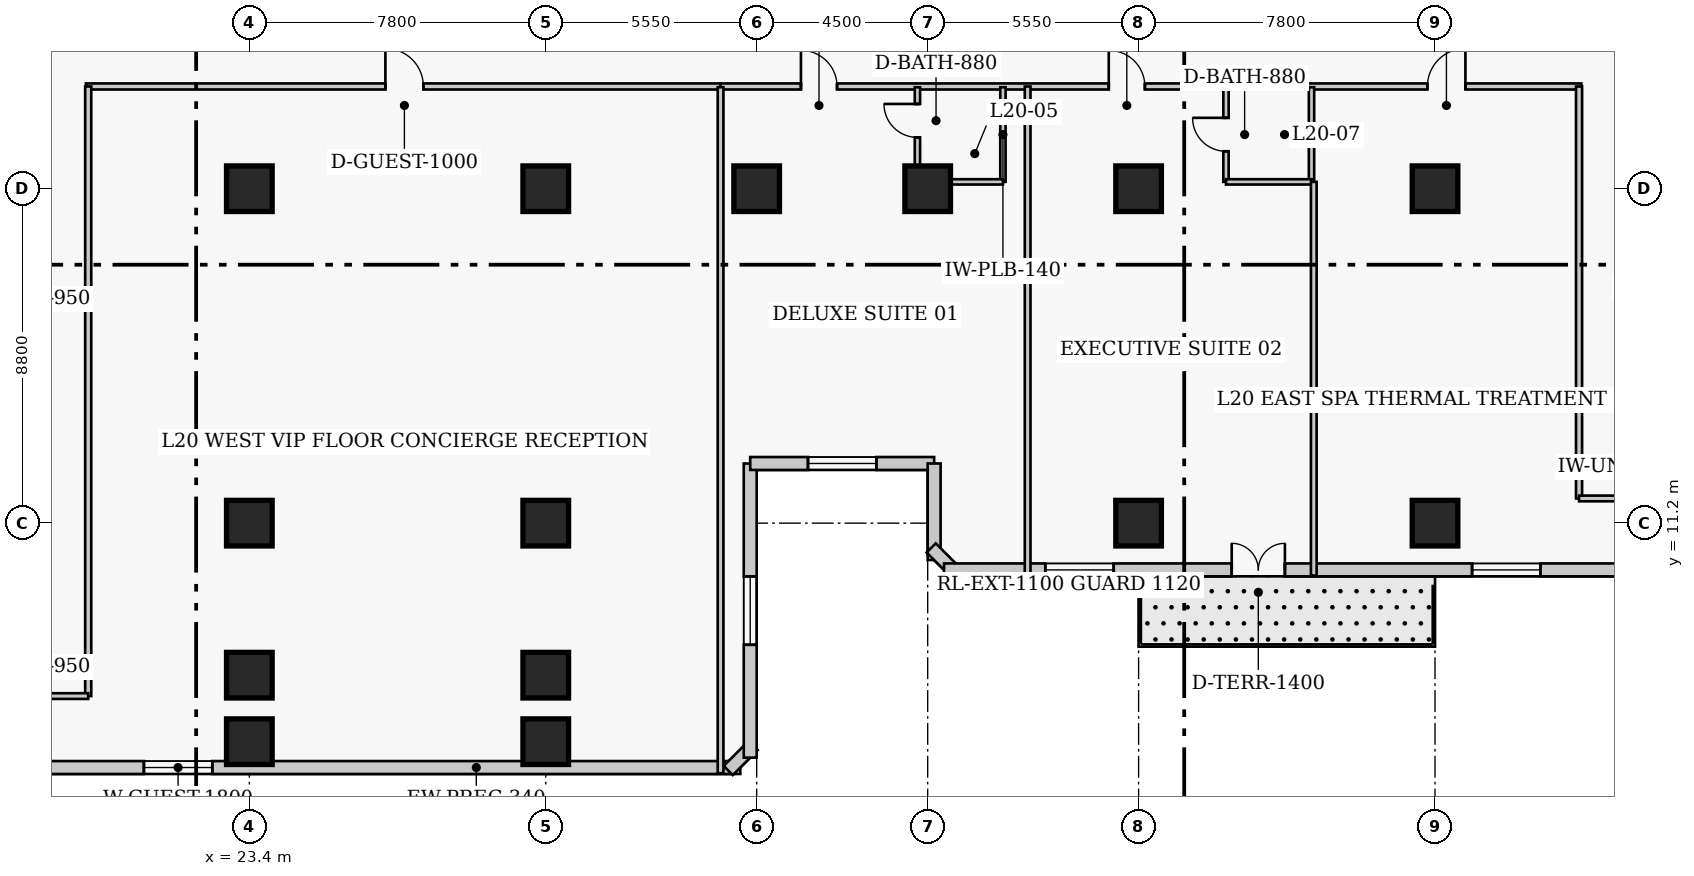
"""IFC4 building model, lengths in metres.
Left out: names, types, materials, properties, quantities, classifications, styles, units other than length and angle.
Written with IfcOpenShell. Run it as: python <this file> out.ifc"""

import sys

from ifc_helpers import new_model, si_unit, direction, frame, frame_2d, origin, origin_2d, place, context, subcontext, project, spatial, rectangle, extrude, element, fill, save


model = new_model("IFC4")
c1 = context("Model", 3, precision=1e-05, world=origin(), true_north=direction((0.0, 1.0)))
c2 = subcontext(c1, "Body", "Model", "MODEL_VIEW")
j1 = project(units=[si_unit("LENGTHUNIT", "METRE"), si_unit("PLANEANGLEUNIT", "RADIAN")], contexts=[c1])
p1 = place(None, origin())
s1 = spatial("IfcSite", under=j1, at=p1, CompositionType="ELEMENT")
p2 = place(p1, origin())
s2 = spatial("IfcBuilding", under=s1, at=p2, CompositionType="ELEMENT")
p3 = place(p2, frame((0.0, 0.0, 84.2)))
s3 = spatial("IfcBuildingStorey", under=s2, at=p3, CompositionType="ELEMENT", Elevation=84.2)
for number, where, z_axis, x_axis in (
    (1, (23.4, 11.2, 0.0), (0.0, 0.0, 1.0), (1.0, 0.0, 0.0)),
    (2, (23.4, 20.0, 0.0), (0.0, 0.0, 1.0), (1.0, 0.0, 0.0)),
    (3, (31.2, 11.2, 0.0), (0.0, 0.0, 1.0), (1.0, 0.0, 0.0)),
    (4, (31.2, 20.0, 0.0), (0.0, 0.0, 1.0), (1.0, 0.0, 0.0)),
    (5, (36.75, 20.0, 0.0), (0.0, 0.0, 1.0), (1.0, 0.0, 0.0)),
    (6, (41.25, 20.0, 0.0), (0.0, 0.0, 1.0), (1.0, 0.0, 0.0)),
    (7, (46.8, 11.2, 0.0), (0.0, 0.0, 1.0), (1.0, 0.0, 0.0)),
    (8, (46.8, 20.0, 0.0), (0.0, 0.0, 1.0), (1.0, 0.0, 0.0)),
    (9, (54.6, 11.2, 0.0), (0.0, 0.0, 1.0), (1.0, 0.0, 0.0)),
    (10, (54.6, 20.0, 0.0), (0.0, 0.0, 1.0), (1.0, 0.0, 0.0)),
    (11, (23.4, 7.2, 0.0), (0.0, 0.0, 1.0), (1.0, 0.0, 0.0)),
    (12, (31.2, 7.2, 0.0), (0.0, 0.0, 1.0), (1.0, 0.0, 0.0)),
    (13, (23.4, 5.45, 0.0), (0.0, 0.0, 1.0), (1.0, 0.0, 0.0)),
    (14, (31.2, 5.45, 0.0), (0.0, 0.0, 1.0), (1.0, 0.0, 0.0)),
):
    element("IfcColumn", number, at=place(p3, frame(where, z_axis=z_axis, x_axis=x_axis)), inside=s3, PredefinedType="COLUMN", context=c2, shape_type="SweptSolid", body=[
        extrude(rectangle(XDim=1.2, YDim=1.2, at=origin_2d()), origin(), (0.0, 0.0, 1.0), 3.8),
    ])
p4 = place(p3, frame((8.03, 4.77, 0.0), z_axis=(0.0, 0.0, 1.0), x_axis=(1.0, 0.0, 0.0)))
e15 = element("IfcWall", 15, at=p4, inside=s3, PredefinedType="SOLIDWALL", context=c2, shape_type="SweptSolid", body=[
    extrude(rectangle(XDim=28.29, YDim=0.34, at=frame_2d((14.145, 0.0))), origin(), (0.0, 0.0, 1.0), 3.54),
])
p5 = place(p4, frame((12.595, 0.0, 0.85)))
e16 = element("IfcOpeningElement", 16, at=p5, cuts=e15, PredefinedType="OPENING", context=c2, shape_type="SweptSolid", body=[
    extrude(rectangle(XDim=1.8, YDim=1.8, at=frame_2d((0.9, 0.9))), frame((0.0, 0.18, 0.0), z_axis=(0.0, -1.0, 0.0), x_axis=(1.0, 0.0, 0.0)), (0.0, 0.0, 1.0), 0.36),
])
p6 = place(p3, frame((36.001, 4.692, 0.0), z_axis=(0.0, 0.0, 1.0), x_axis=(0.707238225886, 0.706975312048, 0.0)))
e17 = element("IfcWall", 17, at=p6, inside=s3, PredefinedType="SOLIDWALL", context=c2, shape_type="SweptSolid", body=[
    extrude(rectangle(XDim=0.929, YDim=0.34, at=frame_2d((0.464, 0.0))), origin(), (0.0, 0.0, 1.0), 3.54),
])
p7 = place(p3, frame((36.58, 5.03, 0.0), z_axis=(0.0, 0.0, 1.0), x_axis=(0.0, 1.0, 0.0)))
e18 = element("IfcWall", 18, at=p7, inside=s3, PredefinedType="SOLIDWALL", context=c2, shape_type="SweptSolid", body=[
    extrude(rectangle(XDim=7.74, YDim=0.34, at=frame_2d((3.87, 0.0))), origin(), (0.0, 0.0, 1.0), 3.54),
])
p8 = place(p7, frame((2.97, 0.0, 0.85)))
e19 = element("IfcOpeningElement", 19, at=p8, cuts=e18, PredefinedType="OPENING", context=c2, shape_type="SweptSolid", body=[
    extrude(rectangle(XDim=1.8, YDim=1.8, at=frame_2d((0.9, 0.9))), frame((0.0, 0.18, 0.0), z_axis=(0.0, -1.0, 0.0), x_axis=(1.0, 0.0, 0.0)), (0.0, 0.0, 1.0), 0.36),
])
p9 = place(p3, frame((36.58, 12.77, 0.0), z_axis=(0.0, 0.0, 1.0), x_axis=(1.0, 0.0, 0.0)))
e20 = element("IfcWall", 20, at=p9, inside=s3, PredefinedType="SOLIDWALL", context=c2, shape_type="SweptSolid", body=[
    extrude(rectangle(XDim=4.84, YDim=0.34, at=frame_2d((2.42, 0.0))), origin(), (0.0, 0.0, 1.0), 3.54),
])
p10 = place(p9, frame((1.52, 0.0, 0.85)))
e21 = element("IfcOpeningElement", 21, at=p10, cuts=e20, PredefinedType="OPENING", context=c2, shape_type="SweptSolid", body=[
    extrude(rectangle(XDim=1.8, YDim=1.8, at=frame_2d((0.9, 0.9))), frame((0.0, 0.18, 0.0), z_axis=(0.0, -1.0, 0.0), x_axis=(1.0, 0.0, 0.0)), (0.0, 0.0, 1.0), 0.36),
])
p11 = place(p3, frame((41.42, 12.77, 0.0), z_axis=(0.0, 0.0, 1.0), x_axis=(0.0, -1.0, 0.0)))
e22 = element("IfcWall", 22, at=p11, inside=s3, PredefinedType="SOLIDWALL", context=c2, shape_type="SweptSolid", body=[
    extrude(rectangle(XDim=2.54, YDim=0.34, at=frame_2d((1.27, 0.0))), origin(), (0.0, 0.0, 1.0), 3.54),
])
p12 = place(p3, frame((41.342, 10.549, 0.0), z_axis=(0.0, 0.0, 1.0), x_axis=(0.707106781187, -0.707106781187, 0.0)))
e23 = element("IfcWall", 23, at=p12, inside=s3, PredefinedType="SOLIDWALL", context=c2, shape_type="SweptSolid", body=[
    extrude(rectangle(XDim=0.929, YDim=0.34, at=frame_2d((0.464, 0.0))), origin(), (0.0, 0.0, 1.0), 3.54),
])
p13 = place(p3, frame((41.68, 9.97, 0.0), z_axis=(0.0, 0.0, 1.0), x_axis=(1.0, 0.0, 0.0)))
e24 = element("IfcWall", 24, at=p13, inside=s3, PredefinedType="SOLIDWALL", context=c2, shape_type="SweptSolid", body=[
    extrude(rectangle(XDim=28.29, YDim=0.34, at=frame_2d((14.145, 0.0))), origin(), (0.0, 0.0, 1.0), 3.54),
])
p14 = place(p13, frame((7.57, 0.0, 0.0)))
e25 = element("IfcOpeningElement", 25, at=p14, cuts=e24, PredefinedType="OPENING", context=c2, shape_type="SweptSolid", body=[
    extrude(rectangle(XDim=1.4, YDim=2.15, at=frame_2d((0.7, 1.075))), frame((0.0, 0.18, 0.0), z_axis=(0.0, -1.0, 0.0), x_axis=(1.0, 0.0, 0.0)), (0.0, 0.0, 1.0), 0.36),
])
p15 = place(p13, frame((2.665, 0.0, 0.85)))
e26 = element("IfcOpeningElement", 26, at=p15, cuts=e24, PredefinedType="OPENING", context=c2, shape_type="SweptSolid", body=[
    extrude(rectangle(XDim=1.8, YDim=1.8, at=frame_2d((0.9, 0.9))), frame((0.0, 0.18, 0.0), z_axis=(0.0, -1.0, 0.0), x_axis=(1.0, 0.0, 0.0)), (0.0, 0.0, 1.0), 0.36),
])
p16 = place(p13, frame((13.895, 0.0, 0.85)))
e27 = element("IfcOpeningElement", 27, at=p16, cuts=e24, PredefinedType="OPENING", context=c2, shape_type="SweptSolid", body=[
    extrude(rectangle(XDim=1.8, YDim=1.8, at=frame_2d((0.9, 0.9))), frame((0.0, 0.18, 0.0), z_axis=(0.0, -1.0, 0.0), x_axis=(1.0, 0.0, 0.0)), (0.0, 0.0, 1.0), 0.36),
])
p17 = place(p3, frame((19.1, 22.69, 0.0), z_axis=(0.0, 0.0, 1.0), x_axis=(1.0, 0.0, 0.0)))
e28 = element("IfcWall", 28, at=p17, inside=s3, PredefinedType="PARTITIONING", context=c2, shape_type="SweptSolid", body=[
    extrude(rectangle(XDim=16.7, YDim=0.16, at=frame_2d((8.35, 0.0))), origin(), (0.0, 0.0, 1.0), 3.54),
])
p18 = place(p17, frame((7.88, 0.0, 0.0)))
e29 = element("IfcOpeningElement", 29, at=p18, cuts=e28, PredefinedType="OPENING", context=c2, shape_type="SweptSolid", body=[
    extrude(rectangle(XDim=1.0, YDim=2.15, at=frame_2d((0.5, 1.075))), frame((0.0, 0.09, 0.0), z_axis=(0.0, -1.0, 0.0), x_axis=(1.0, 0.0, 0.0)), (0.0, 0.0, 1.0), 0.18),
])
p19 = place(p3, frame((35.8, 22.69, 0.0), z_axis=(0.0, 0.0, 1.0), x_axis=(1.0, 0.0, 0.0)))
e30 = element("IfcWall", 30, at=p19, inside=s3, PredefinedType="PARTITIONING", context=c2, shape_type="SweptSolid", body=[
    extrude(rectangle(XDim=22.65, YDim=0.16, at=frame_2d((11.325, 0.0))), origin(), (0.0, 0.0, 1.0), 3.54),
])
p20 = place(p19, frame((2.115, 0.0, 0.0)))
e31 = element("IfcOpeningElement", 31, at=p20, cuts=e30, PredefinedType="OPENING", context=c2, shape_type="SweptSolid", body=[
    extrude(rectangle(XDim=0.95, YDim=2.1, at=frame_2d((0.475, 1.05))), frame((0.0, 0.09, 0.0), z_axis=(0.0, -1.0, 0.0), x_axis=(1.0, 0.0, 0.0)), (0.0, 0.0, 1.0), 0.18),
])
p21 = place(p19, frame((10.215, 0.0, 0.0)))
e32 = element("IfcOpeningElement", 32, at=p21, cuts=e30, PredefinedType="OPENING", context=c2, shape_type="SweptSolid", body=[
    extrude(rectangle(XDim=0.95, YDim=2.1, at=frame_2d((0.475, 1.05))), frame((0.0, 0.09, 0.0), z_axis=(0.0, -1.0, 0.0), x_axis=(1.0, 0.0, 0.0)), (0.0, 0.0, 1.0), 0.18),
])
p22 = place(p19, frame((18.6, 0.0, 0.0)))
e33 = element("IfcOpeningElement", 33, at=p22, cuts=e30, PredefinedType="OPENING", context=c2, shape_type="SweptSolid", body=[
    extrude(rectangle(XDim=1.0, YDim=2.15, at=frame_2d((0.5, 1.075))), frame((0.0, 0.09, 0.0), z_axis=(0.0, -1.0, 0.0), x_axis=(1.0, 0.0, 0.0)), (0.0, 0.0, 1.0), 0.18),
])
p23 = place(p3, frame((19.16, 6.65, 0.0), z_axis=(0.0, 0.0, 1.0), x_axis=(0.0, 1.0, 0.0)))
e34 = element("IfcWall", 34, at=p23, inside=s3, PredefinedType="PARTITIONING", context=c2, shape_type="SweptSolid", body=[
    extrude(rectangle(XDim=16.04, YDim=0.16, at=frame_2d((8.02, 0.0))), origin(), (0.0, 0.0, 1.0), 3.54),
])
p24 = place(p3, frame((58.39, 11.85, 0.0), z_axis=(0.0, 0.0, 1.0), x_axis=(0.0, 1.0, 0.0)))
e35 = element("IfcWall", 35, at=p24, inside=s3, PredefinedType="PARTITIONING", context=c2, shape_type="SweptSolid", body=[
    extrude(rectangle(XDim=10.84, YDim=0.16, at=frame_2d((5.42, 0.0))), origin(), (0.0, 0.0, 1.0), 3.083),
])
p25 = place(p3, frame((58.39, 11.85, 0.0), z_axis=(0.0, 0.0, 1.0), x_axis=(1.0, 0.0, 0.0)))
e36 = element("IfcWall", 36, at=p25, inside=s3, PredefinedType="PARTITIONING", context=c2, shape_type="SweptSolid", body=[
    extrude(rectangle(XDim=2.22, YDim=0.15, at=frame_2d((1.11, 0.0))), origin(), (0.0, 0.0, 1.0), 3.54),
])
p26 = place(p3, frame((16.94, 6.65, 0.0), z_axis=(0.0, 0.0, 1.0), x_axis=(1.0, 0.0, 0.0)))
e37 = element("IfcWall", 37, at=p26, inside=s3, PredefinedType="PARTITIONING", context=c2, shape_type="SweptSolid", body=[
    extrude(rectangle(XDim=2.22, YDim=0.15, at=frame_2d((1.11, 0.0))), origin(), (0.0, 0.0, 1.0), 3.54),
])
p27 = place(p3, frame((35.8, 4.62, 0.0), z_axis=(0.0, 0.0, 1.0), x_axis=(0.0, 1.0, 0.0)))
e38 = element("IfcWall", 38, at=p27, inside=s3, PredefinedType="PARTITIONING", context=c2, shape_type="SweptSolid", body=[
    extrude(rectangle(XDim=18.05, YDim=0.15, at=frame_2d((9.025, 0.0))), origin(), (0.0, 0.0, 1.0), 3.54),
])
p28 = place(p3, frame((40.98, 20.18, 0.0), z_axis=(0.0, 0.0, 1.0), x_axis=(0.0, 1.0, 0.0)))
e39 = element("IfcWall", 39, at=p28, inside=s3, PredefinedType="PLUMBINGWALL", context=c2, shape_type="SweptSolid", body=[
    extrude(rectangle(XDim=2.49, YDim=0.14, at=frame_2d((1.245, 0.0))), origin(), (0.0, 0.0, 1.0), 3.54),
])
p29 = place(p28, frame((1.17, 0.0, 0.0)))
e40 = element("IfcOpeningElement", 40, at=p29, cuts=e39, PredefinedType="OPENING", context=c2, shape_type="SweptSolid", body=[
    extrude(rectangle(XDim=0.88, YDim=2.05, at=frame_2d((0.44, 1.025))), frame((0.0, 0.08, 0.0), z_axis=(0.0, -1.0, 0.0), x_axis=(1.0, 0.0, 0.0)), (0.0, 0.0, 1.0), 0.16),
])
p30 = place(p3, frame((43.23, 20.18, 0.0), z_axis=(0.0, 0.0, 1.0), x_axis=(0.0, 1.0, 0.0)))
e41 = element("IfcWall", 41, at=p30, inside=s3, PredefinedType="PLUMBINGWALL", context=c2, shape_type="SweptSolid", body=[
    extrude(rectangle(XDim=2.49, YDim=0.14, at=frame_2d((1.245, 0.0))), origin(), (0.0, 0.0, 1.0), 3.54),
])
p31 = place(p3, frame((40.98, 20.18, 0.0), z_axis=(0.0, 0.0, 1.0), x_axis=(1.0, 0.0, 0.0)))
e42 = element("IfcWall", 42, at=p31, inside=s3, PredefinedType="PLUMBINGWALL", context=c2, shape_type="SweptSolid", body=[
    extrude(rectangle(XDim=2.25, YDim=0.14, at=frame_2d((1.125, 0.0))), origin(), (0.0, 0.0, 1.0), 2.679),
])
p32 = place(p3, frame((43.88, 9.82, 0.0), z_axis=(0.0, 0.0, 1.0), x_axis=(0.0, 1.0, 0.0)))
e43 = element("IfcWall", 43, at=p32, inside=s3, PredefinedType="PARTITIONING", context=c2, shape_type="SweptSolid", body=[
    extrude(rectangle(XDim=12.87, YDim=0.15, at=frame_2d((6.435, 0.0))), origin(), (0.0, 0.0, 1.0), 3.54),
])
p33 = place(p3, frame((49.1, 20.18, 0.0), z_axis=(0.0, 0.0, 1.0), x_axis=(0.0, 1.0, 0.0)))
e44 = element("IfcWall", 44, at=p33, inside=s3, PredefinedType="PLUMBINGWALL", context=c2, shape_type="SweptSolid", body=[
    extrude(rectangle(XDim=2.49, YDim=0.14, at=frame_2d((1.245, 0.0))), origin(), (0.0, 0.0, 1.0), 3.54),
])
p34 = place(p33, frame((0.805, 0.0, 0.0)))
e45 = element("IfcOpeningElement", 45, at=p34, cuts=e44, PredefinedType="OPENING", context=c2, shape_type="SweptSolid", body=[
    extrude(rectangle(XDim=0.88, YDim=2.05, at=frame_2d((0.44, 1.025))), frame((0.0, 0.08, 0.0), z_axis=(0.0, -1.0, 0.0), x_axis=(1.0, 0.0, 0.0)), (0.0, 0.0, 1.0), 0.16),
])
p35 = place(p3, frame((51.35, 20.18, 0.0), z_axis=(0.0, 0.0, 1.0), x_axis=(0.0, 1.0, 0.0)))
e46 = element("IfcWall", 46, at=p35, inside=s3, PredefinedType="PLUMBINGWALL", context=c2, shape_type="SweptSolid", body=[
    extrude(rectangle(XDim=2.49, YDim=0.14, at=frame_2d((1.245, 0.0))), origin(), (0.0, 0.0, 1.0), 3.54),
])
p36 = place(p3, frame((49.1, 20.18, 0.0), z_axis=(0.0, 0.0, 1.0), x_axis=(1.0, 0.0, 0.0)))
e47 = element("IfcWall", 47, at=p36, inside=s3, PredefinedType="PLUMBINGWALL", context=c2, shape_type="SweptSolid", body=[
    extrude(rectangle(XDim=2.25, YDim=0.14, at=frame_2d((1.125, 0.0))), origin(), (0.0, 0.0, 1.0), 2.679),
])
p37 = place(p3, frame((51.41, 9.82, 0.0), z_axis=(0.0, 0.0, 1.0), x_axis=(0.0, 1.0, 0.0)))
e48 = element("IfcWall", 48, at=p37, inside=s3, PredefinedType="PARTITIONING", context=c2, shape_type="SweptSolid", body=[
    extrude(rectangle(XDim=10.36, YDim=0.15, at=frame_2d((5.18, 0.0))), origin(), (0.0, 0.0, 1.0), 3.54),
])
p38 = place(p5, origin())
e49 = element("IfcWindow", 49, at=p38, inside=s3, PartitioningType="SINGLE_PANEL", PredefinedType="WINDOW", context=c2, shape_type="SweptSolid", body=[
    extrude(rectangle(XDim=1.8, YDim=1.8, at=frame_2d((0.9, 0.9))), frame((0.0, 0.03, 0.0), z_axis=(0.0, -1.0, 0.0), x_axis=(1.0, 0.0, 0.0)), (0.0, 0.0, 1.0), 0.06),
])
fill(e16, e49)
p39 = place(p8, origin())
e50 = element("IfcWindow", 50, at=p39, inside=s3, PartitioningType="SINGLE_PANEL", PredefinedType="WINDOW", context=c2, shape_type="SweptSolid", body=[
    extrude(rectangle(XDim=1.8, YDim=1.8, at=frame_2d((0.9, 0.9))), frame((0.0, 0.03, 0.0), z_axis=(0.0, -1.0, 0.0), x_axis=(1.0, 0.0, 0.0)), (0.0, 0.0, 1.0), 0.06),
])
fill(e19, e50)
p40 = place(p10, origin())
e51 = element("IfcWindow", 51, at=p40, inside=s3, PartitioningType="SINGLE_PANEL", PredefinedType="WINDOW", context=c2, shape_type="SweptSolid", body=[
    extrude(rectangle(XDim=1.8, YDim=1.8, at=frame_2d((0.9, 0.9))), frame((0.0, 0.03, 0.0), z_axis=(0.0, -1.0, 0.0), x_axis=(1.0, 0.0, 0.0)), (0.0, 0.0, 1.0), 0.06),
])
fill(e21, e51)
p41 = place(p14, origin())
e52 = element("IfcDoor", 52, at=p41, inside=s3, OperationType="DOUBLE_DOOR_SINGLE_SWING", PredefinedType="DOOR", context=c2, shape_type="SweptSolid", body=[
    extrude(rectangle(XDim=1.4, YDim=2.15, at=frame_2d((0.7, 1.075))), frame((0.0, 0.025, 0.0), z_axis=(0.0, -1.0, 0.0), x_axis=(1.0, 0.0, 0.0)), (0.0, 0.0, 1.0), 0.05),
])
fill(e25, e52)
p42 = place(p15, origin())
e53 = element("IfcWindow", 53, at=p42, inside=s3, PartitioningType="SINGLE_PANEL", PredefinedType="WINDOW", context=c2, shape_type="SweptSolid", body=[
    extrude(rectangle(XDim=1.8, YDim=1.8, at=frame_2d((0.9, 0.9))), frame((0.0, 0.03, 0.0), z_axis=(0.0, -1.0, 0.0), x_axis=(1.0, 0.0, 0.0)), (0.0, 0.0, 1.0), 0.06),
])
fill(e26, e53)
p43 = place(p16, origin())
e54 = element("IfcWindow", 54, at=p43, inside=s3, PartitioningType="SINGLE_PANEL", PredefinedType="WINDOW", context=c2, shape_type="SweptSolid", body=[
    extrude(rectangle(XDim=1.8, YDim=1.8, at=frame_2d((0.9, 0.9))), frame((0.0, 0.03, 0.0), z_axis=(0.0, -1.0, 0.0), x_axis=(1.0, 0.0, 0.0)), (0.0, 0.0, 1.0), 0.06),
])
fill(e27, e54)
p44 = place(p18, origin())
e55 = element("IfcDoor", 55, at=p44, inside=s3, OperationType="SINGLE_SWING_LEFT", PredefinedType="DOOR", context=c2, shape_type="SweptSolid", body=[
    extrude(rectangle(XDim=1.0, YDim=2.15, at=frame_2d((0.5, 1.075))), frame((0.0, 0.025, 0.0), z_axis=(0.0, -1.0, 0.0), x_axis=(1.0, 0.0, 0.0)), (0.0, 0.0, 1.0), 0.05),
])
fill(e29, e55)
p45 = place(p29, origin())
e56 = element("IfcDoor", 56, at=p45, inside=s3, OperationType="SINGLE_SWING_RIGHT", PredefinedType="DOOR", context=c2, shape_type="SweptSolid", body=[
    extrude(rectangle(XDim=0.88, YDim=2.05, at=frame_2d((0.44, 1.025))), frame((0.0, 0.025, 0.0), z_axis=(0.0, -1.0, 0.0), x_axis=(1.0, 0.0, 0.0)), (0.0, 0.0, 1.0), 0.05),
])
fill(e40, e56)
p46 = place(p20, origin())
e57 = element("IfcDoor", 57, at=p46, inside=s3, OperationType="SINGLE_SWING_LEFT", PredefinedType="DOOR", context=c2, shape_type="SweptSolid", body=[
    extrude(rectangle(XDim=0.95, YDim=2.1, at=frame_2d((0.475, 1.05))), frame((0.0, 0.025, 0.0), z_axis=(0.0, -1.0, 0.0), x_axis=(1.0, 0.0, 0.0)), (0.0, 0.0, 1.0), 0.05),
])
fill(e31, e57)
p47 = place(p34, origin())
e58 = element("IfcDoor", 58, at=p47, inside=s3, OperationType="SINGLE_SWING_RIGHT", PredefinedType="DOOR", context=c2, shape_type="SweptSolid", body=[
    extrude(rectangle(XDim=0.88, YDim=2.05, at=frame_2d((0.44, 1.025))), frame((0.0, 0.025, 0.0), z_axis=(0.0, -1.0, 0.0), x_axis=(1.0, 0.0, 0.0)), (0.0, 0.0, 1.0), 0.05),
])
fill(e45, e58)
p48 = place(p21, origin())
e59 = element("IfcDoor", 59, at=p48, inside=s3, OperationType="SINGLE_SWING_LEFT", PredefinedType="DOOR", context=c2, shape_type="SweptSolid", body=[
    extrude(rectangle(XDim=0.95, YDim=2.1, at=frame_2d((0.475, 1.05))), frame((0.0, 0.025, 0.0), z_axis=(0.0, -1.0, 0.0), x_axis=(1.0, 0.0, 0.0)), (0.0, 0.0, 1.0), 0.05),
])
fill(e32, e59)
p49 = place(p22, origin())
e60 = element("IfcDoor", 60, at=p49, inside=s3, OperationType="SINGLE_SWING_RIGHT", PredefinedType="DOOR", context=c2, shape_type="SweptSolid", body=[
    extrude(rectangle(XDim=1.0, YDim=2.15, at=frame_2d((0.5, 1.075))), frame((0.0, 0.025, 0.0), z_axis=(0.0, -1.0, 0.0), x_axis=(1.0, 0.0, 0.0)), (0.0, 0.0, 1.0), 0.05),
])
fill(e33, e60)
save(model, sys.argv[1])
